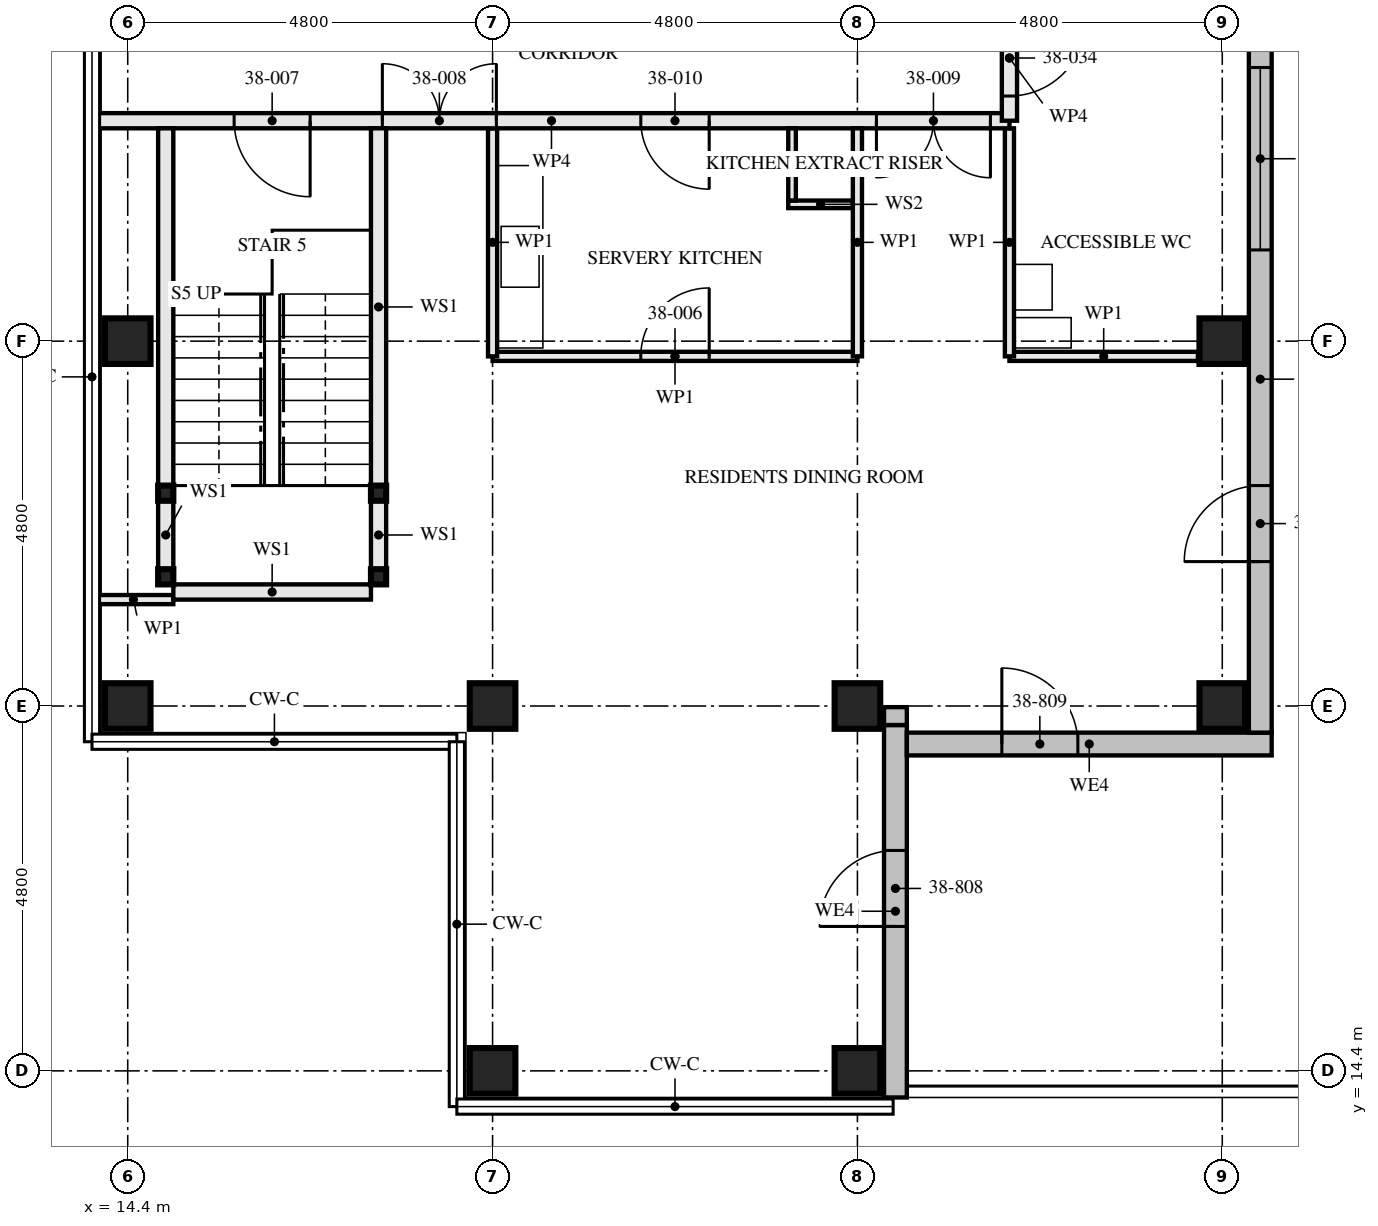
"""IFC4 building model, lengths in metres.
Left out: names, types, materials, properties, quantities, classifications, styles, units other than length and angle.
Written with IfcOpenShell. Run it as: python <this file> out.ifc"""

import sys

from ifc_helpers import new_model, si_unit, direction, frame, frame_2d, origin, origin_2d, place, context, subcontext, project, spatial, rectangle, hollow_rectangle, extrude, element, fill, save


model = new_model("IFC4")
c1 = context("Model", 3, precision=1e-05, world=origin(), true_north=direction((0.0, 1.0)))
c2 = subcontext(c1, "Body", "Model", "MODEL_VIEW")
j1 = project(units=[si_unit("LENGTHUNIT", "METRE"), si_unit("PLANEANGLEUNIT", "RADIAN")], contexts=[c1])
p1 = place(None, origin())
s1 = spatial("IfcSite", under=j1, at=p1, CompositionType="ELEMENT")
p2 = place(p1, origin())
s2 = spatial("IfcBuilding", under=s1, at=p2, CompositionType="ELEMENT")
p3 = place(p2, frame((0.0, 0.0, 141.0)))
s3 = spatial("IfcBuildingStorey", under=s2, at=p3, CompositionType="ELEMENT", Elevation=141.0)
for number, where, z_axis, x_axis in (
    (1, (14.4, 19.2, 0.0), (0.0, 0.0, 1.0), (0.0, 1.0, 0.0)),
    (2, (14.4, 24.0, 0.0), (0.0, 0.0, 1.0), (1.0, 0.0, 0.0)),
    (3, (19.2, 14.4, 0.0), (0.0, 0.0, 1.0), (0.0, 1.0, 0.0)),
    (4, (19.2, 19.2, 0.0), (0.0, 0.0, 1.0), (0.0, 1.0, 0.0)),
    (5, (24.0, 14.4, 0.0), (0.0, 0.0, 1.0), (0.0, 1.0, 0.0)),
    (6, (24.0, 19.2, 0.0), (0.0, 0.0, 1.0), (0.0, 1.0, 0.0)),
    (7, (28.8, 19.2, 0.0), (0.0, 0.0, 1.0), (0.0, 1.0, 0.0)),
    (8, (28.8, 24.0, 0.0), (0.0, 0.0, 1.0), (1.0, 0.0, 0.0)),
):
    element("IfcColumn", number, at=place(p3, frame(where, z_axis=z_axis, x_axis=x_axis)), inside=s3, PredefinedType="COLUMN", context=c2, shape_type="SweptSolid", body=[
        extrude(hollow_rectangle(XDim=0.6, YDim=0.6, WallThickness=0.08, at=origin_2d()), origin(), (0.0, 0.0, 1.0), 3.5),
    ])
for number, where, z_axis, x_axis in (
    (9, (14.9, 20.9, 0.0), (0.0, 0.0, 1.0), (1.0, 0.0, 0.0)),
    (10, (17.7, 20.9, 0.0), (0.0, 0.0, 1.0), (1.0, 0.0, 0.0)),
    (11, (14.9, 22.0, 0.0), (0.0, 0.0, 1.0), (1.0, 0.0, 0.0)),
    (12, (17.7, 22.0, 0.0), (0.0, 0.0, 1.0), (1.0, 0.0, 0.0)),
):
    element("IfcColumn", number, at=place(p3, frame(where, z_axis=z_axis, x_axis=x_axis)), inside=s3, PredefinedType="COLUMN", context=c2, shape_type="SweptSolid", body=[
        extrude(hollow_rectangle(XDim=0.2, YDim=0.2, WallThickness=0.008, at=origin_2d()), origin(), (0.0, 0.0, 1.0), 3.33),
    ])
p4 = place(p3, frame((24.5, 14.05, 0.0), z_axis=(0.0, 0.0, 1.0), x_axis=(0.0, 1.0, 0.0)))
e13 = element("IfcWall", 13, at=p4, inside=s3, PredefinedType="SOLIDWALL", context=c2, shape_type="SweptSolid", body=[
    extrude(rectangle(XDim=4.9, YDim=0.3, at=frame_2d((2.45, 0.0))), origin(), (0.0, 0.0, 1.0), 3.5),
])
p5 = place(p4, frame((2.25, 0.0, 0.0)))
e14 = element("IfcOpeningElement", 14, at=p5, cuts=e13, PredefinedType="OPENING", context=c2, shape_type="SweptSolid", body=[
    extrude(rectangle(XDim=1.0, YDim=2.4, at=frame_2d((0.5, 1.2))), frame((0.0, 0.161, 0.0), z_axis=(0.0, -1.0, 0.0), x_axis=(1.0, 0.0, 0.0)), (0.0, 0.0, 1.0), 0.321),
])
p6 = place(p3, frame((24.65, 18.7, 0.0), z_axis=(0.0, 0.0, 1.0), x_axis=(1.0, 0.0, 0.0)))
e15 = element("IfcWall", 15, at=p6, inside=s3, PredefinedType="SOLIDWALL", context=c2, shape_type="SweptSolid", body=[
    extrude(rectangle(XDim=4.8, YDim=0.3, at=frame_2d((2.4, 0.0))), origin(), (0.0, 0.0, 1.0), 3.5),
])
p7 = place(p6, frame((1.25, 0.0, 0.0)))
e16 = element("IfcOpeningElement", 16, at=p7, cuts=e15, PredefinedType="OPENING", context=c2, shape_type="SweptSolid", body=[
    extrude(rectangle(XDim=1.0, YDim=2.4, at=frame_2d((0.5, 1.2))), frame((0.0, 0.161, 0.0), z_axis=(0.0, -1.0, 0.0), x_axis=(1.0, 0.0, 0.0)), (0.0, 0.0, 1.0), 0.321),
])
p8 = place(p3, frame((29.3, 18.85, 0.0), z_axis=(0.0, 0.0, 1.0), x_axis=(0.0, 1.0, 0.0)))
e17 = element("IfcWall", 17, at=p8, inside=s3, PredefinedType="SOLIDWALL", context=c2, shape_type="SweptSolid", body=[
    extrude(rectangle(XDim=9.3, YDim=0.3, at=frame_2d((4.65, 0.0))), origin(), (0.0, 0.0, 1.0), 3.5),
])
p9 = place(p8, frame((2.25, 0.0, 0.0)))
e18 = element("IfcOpeningElement", 18, at=p9, cuts=e17, PredefinedType="OPENING", context=c2, shape_type="SweptSolid", body=[
    extrude(rectangle(XDim=1.0, YDim=2.4, at=frame_2d((0.5, 1.2))), frame((0.0, 0.161, 0.0), z_axis=(0.0, -1.0, 0.0), x_axis=(1.0, 0.0, 0.0)), (0.0, 0.0, 1.0), 0.321),
])
p10 = place(p8, frame((6.35, 0.0, 0.6)))
e19 = element("IfcOpeningElement", 19, at=p10, cuts=e17, PredefinedType="OPENING", context=c2, shape_type="SweptSolid", body=[
    extrude(rectangle(XDim=2.4, YDim=1.8, at=frame_2d((1.2, 0.9))), frame((0.0, 0.161, 0.0), z_axis=(0.0, -1.0, 0.0), x_axis=(1.0, 0.0, 0.0)), (0.0, 0.0, 1.0), 0.321),
])
p11 = place(p3, frame((24.5, 18.95, 2.39), z_axis=(0.0, 0.0, 1.0), x_axis=(0.0, 1.0, 0.0)))
e20 = element("IfcWall", 20, at=p11, inside=s3, PredefinedType="SOLIDWALL", context=c2, shape_type="SweptSolid", body=[
    extrude(rectangle(XDim=0.235, YDim=0.3, at=frame_2d((0.118, 0.0))), origin(), (0.0, 0.0, 1.0), 0.88),
])
p12 = place(p3, frame((14.9, 21.0, 0.0), z_axis=(0.0, 0.0, 1.0), x_axis=(0.0, 1.0, 0.0)))
e21 = element("IfcWall", 21, at=p12, inside=s3, PredefinedType="SOLIDWALL", context=c2, shape_type="SweptSolid", body=[
    extrude(rectangle(XDim=0.9, YDim=0.2, at=frame_2d((0.45, 0.0))), origin(), (0.0, 0.0, 1.0), 2.99),
])
p13 = place(p3, frame((14.9, 22.1, 0.0), z_axis=(0.0, 0.0, 1.0), x_axis=(0.0, 1.0, 0.0)))
e22 = element("IfcWall", 22, at=p13, inside=s3, PredefinedType="SOLIDWALL", context=c2, shape_type="SweptSolid", body=[
    extrude(rectangle(XDim=4.7, YDim=0.2, at=frame_2d((2.35, 0.0))), origin(), (0.0, 0.0, 1.0), 2.99),
])
p14 = place(p3, frame((17.7, 21.0, 0.0), z_axis=(0.0, 0.0, 1.0), x_axis=(0.0, 1.0, 0.0)))
e23 = element("IfcWall", 23, at=p14, inside=s3, PredefinedType="SOLIDWALL", context=c2, shape_type="SweptSolid", body=[
    extrude(rectangle(XDim=0.9, YDim=0.2, at=frame_2d((0.45, 0.0))), origin(), (0.0, 0.0, 1.0), 2.99),
])
p15 = place(p3, frame((17.7, 22.1, 0.0), z_axis=(0.0, 0.0, 1.0), x_axis=(0.0, 1.0, 0.0)))
e24 = element("IfcWall", 24, at=p15, inside=s3, PredefinedType="SOLIDWALL", context=c2, shape_type="SweptSolid", body=[
    extrude(rectangle(XDim=4.7, YDim=0.2, at=frame_2d((2.35, 0.0))), origin(), (0.0, 0.0, 1.0), 2.99),
])
p16 = place(p3, frame((15.0, 20.7, 0.0), z_axis=(0.0, 0.0, 1.0), x_axis=(1.0, 0.0, 0.0)))
e25 = element("IfcWall", 25, at=p16, inside=s3, PredefinedType="SOLIDWALL", context=c2, shape_type="SweptSolid", body=[
    extrude(rectangle(XDim=2.6, YDim=0.2, at=frame_2d((1.3, 0.0))), origin(), (0.0, 0.0, 1.0), 3.33),
])
p17 = place(p3, frame((24.0, 23.8, 0.0), z_axis=(0.0, 0.0, 1.0), x_axis=(0.0, 1.0, 0.0)))
e26 = element("IfcWall", 26, at=p17, inside=s3, PredefinedType="PARTITIONING", context=c2, shape_type="SweptSolid", body=[
    extrude(rectangle(XDim=3.0, YDim=0.12, at=frame_2d((1.5, 0.0))), origin(), (0.0, 0.0, 1.0), 2.55),
])
p18 = place(p3, frame((23.14, 25.85, 0.0), z_axis=(0.0, 0.0, 1.0), x_axis=(0.0, 1.0, 0.0)))
e27 = element("IfcWall", 27, at=p18, inside=s3, PredefinedType="SOLIDWALL", context=c2, shape_type="SweptSolid", body=[
    extrude(rectangle(XDim=0.95, YDim=0.1, at=frame_2d((0.475, 0.0))), origin(), (0.0, 0.0, 1.0), 3.33),
])
p19 = place(p3, frame((23.09, 25.8, 0.0), z_axis=(0.0, 0.0, 1.0), x_axis=(1.0, 0.0, 0.0)))
e28 = element("IfcWall", 28, at=p19, inside=s3, PredefinedType="SOLIDWALL", context=c2, shape_type="SweptSolid", body=[
    extrude(rectangle(XDim=0.85, YDim=0.1, at=frame_2d((0.425, 0.0))), origin(), (0.0, 0.0, 1.0), 3.33),
])
p20 = place(p3, frame((19.2, 23.8, 0.0), z_axis=(0.0, 0.0, 1.0), x_axis=(0.0, 1.0, 0.0)))
e29 = element("IfcWall", 29, at=p20, inside=s3, PredefinedType="PARTITIONING", context=c2, shape_type="SweptSolid", body=[
    extrude(rectangle(XDim=3.0, YDim=0.12, at=frame_2d((1.5, 0.0))), origin(), (0.0, 0.0, 1.0), 2.55),
])
p21 = place(p3, frame((19.2, 23.8, 0.0), z_axis=(0.0, 0.0, 1.0), x_axis=(1.0, 0.0, 0.0)))
e30 = element("IfcWall", 30, at=p21, inside=s3, PredefinedType="PARTITIONING", context=c2, shape_type="SweptSolid", body=[
    extrude(rectangle(XDim=4.8, YDim=0.12, at=frame_2d((2.4, 0.0))), origin(), (0.0, 0.0, 1.0), 3.33),
])
p22 = place(p21, frame((1.95, 0.0, 0.0)))
e31 = element("IfcOpeningElement", 31, at=p22, cuts=e30, PredefinedType="OPENING", context=c2, shape_type="SweptSolid", body=[
    extrude(rectangle(XDim=0.9, YDim=2.1, at=frame_2d((0.45, 1.05))), frame((0.0, 0.071, 0.0), z_axis=(0.0, -1.0, 0.0), x_axis=(1.0, 0.0, 0.0)), (0.0, 0.0, 1.0), 0.141),
])
p23 = place(p3, frame((26.0, 23.8, 0.0), z_axis=(0.0, 0.0, 1.0), x_axis=(0.0, 1.0, 0.0)))
e32 = element("IfcWall", 32, at=p23, inside=s3, PredefinedType="PARTITIONING", context=c2, shape_type="SweptSolid", body=[
    extrude(rectangle(XDim=3.0, YDim=0.12, at=frame_2d((1.5, 0.0))), origin(), (0.0, 0.0, 1.0), 2.55),
])
p24 = place(p3, frame((26.0, 23.8, 0.0), z_axis=(0.0, 0.0, 1.0), x_axis=(1.0, 0.0, 0.0)))
e33 = element("IfcWall", 33, at=p24, inside=s3, PredefinedType="PARTITIONING", context=c2, shape_type="SweptSolid", body=[
    extrude(rectangle(XDim=2.48, YDim=0.12, at=frame_2d((1.24, 0.0))), origin(), (0.0, 0.0, 1.0), 3.33),
])
p25 = place(p3, frame((13.95, 20.6, 0.0), z_axis=(0.0, 0.0, 1.0), x_axis=(1.0, 0.0, 0.0)))
e34 = element("IfcWall", 34, at=p25, inside=s3, PredefinedType="PARTITIONING", context=c2, shape_type="SweptSolid", body=[
    extrude(rectangle(XDim=1.05, YDim=0.12, at=frame_2d((0.525, 0.0))), origin(), (0.0, 0.0, 1.0), 2.32),
])
p26 = place(p3, frame((13.95, 26.9, 0.0), z_axis=(0.0, 0.0, 1.0), x_axis=(1.0, 0.0, 0.0)))
e35 = element("IfcWall", 35, at=p26, inside=s3, PredefinedType="PARTITIONING", context=c2, shape_type="SweptSolid", body=[
    extrude(rectangle(XDim=12.05, YDim=0.2, at=frame_2d((6.025, 0.0))), origin(), (0.0, 0.0, 1.0), 2.32),
])
p27 = place(p26, frame((1.85, 0.0, 0.0)))
e36 = element("IfcOpeningElement", 36, at=p27, cuts=e35, PredefinedType="OPENING", context=c2, shape_type="SweptSolid", body=[
    extrude(rectangle(XDim=1.0, YDim=2.1, at=frame_2d((0.5, 1.05))), frame((0.0, 0.111, 0.0), z_axis=(0.0, -1.0, 0.0), x_axis=(1.0, 0.0, 0.0)), (0.0, 0.0, 1.0), 0.221),
])
p28 = place(p26, frame((3.8, 0.0, 0.0)))
e37 = element("IfcOpeningElement", 37, at=p28, cuts=e35, PredefinedType="OPENING", context=c2, shape_type="SweptSolid", body=[
    extrude(rectangle(XDim=1.5, YDim=2.1, at=frame_2d((0.75, 1.05))), frame((0.0, 0.111, 0.0), z_axis=(0.0, -1.0, 0.0), x_axis=(1.0, 0.0, 0.0)), (0.0, 0.0, 1.0), 0.221),
])
p29 = place(p26, frame((10.3, 0.0, 0.0)))
e38 = element("IfcOpeningElement", 38, at=p29, cuts=e35, PredefinedType="OPENING", context=c2, shape_type="SweptSolid", body=[
    extrude(rectangle(XDim=1.5, YDim=2.1, at=frame_2d((0.75, 1.05))), frame((0.0, 0.111, 0.0), z_axis=(0.0, -1.0, 0.0), x_axis=(1.0, 0.0, 0.0)), (0.0, 0.0, 1.0), 0.221),
])
p30 = place(p26, frame((7.2, 0.0, 0.0)))
e39 = element("IfcOpeningElement", 39, at=p30, cuts=e35, PredefinedType="OPENING", context=c2, shape_type="SweptSolid", body=[
    extrude(rectangle(XDim=0.9, YDim=2.1, at=frame_2d((0.45, 1.05))), frame((0.0, 0.111, 0.0), z_axis=(0.0, -1.0, 0.0), x_axis=(1.0, 0.0, 0.0)), (0.0, 0.0, 1.0), 0.221),
])
p31 = place(p3, frame((26.0, 26.9, 0.0), z_axis=(0.0, 0.0, 1.0), x_axis=(0.0, 1.0, 0.0)))
e40 = element("IfcWall", 40, at=p31, inside=s3, PredefinedType="PARTITIONING", context=c2, shape_type="SweptSolid", body=[
    extrude(rectangle(XDim=1.65, YDim=0.2, at=frame_2d((0.825, 0.0))), origin(), (0.0, 0.0, 1.0), 3.33),
])
p32 = place(p31, frame((0.325, 0.0, 0.0)))
e41 = element("IfcOpeningElement", 41, at=p32, cuts=e40, PredefinedType="OPENING", context=c2, shape_type="SweptSolid", body=[
    extrude(rectangle(XDim=1.0, YDim=2.1, at=frame_2d((0.5, 1.05))), frame((0.0, 0.111, 0.0), z_axis=(0.0, -1.0, 0.0), x_axis=(1.0, 0.0, 0.0)), (0.0, 0.0, 1.0), 0.221),
])
p33 = place(p5, origin())
e42 = element("IfcDoor", 42, at=p33, inside=s3, OperationType="SINGLE_SWING_LEFT", PredefinedType="DOOR", context=c2, shape_type="SweptSolid", body=[
    extrude(rectangle(XDim=1.0, YDim=2.4, at=frame_2d((0.5, 1.2))), frame((0.0, 0.035, 0.0), z_axis=(0.0, -1.0, 0.0), x_axis=(1.0, 0.0, 0.0)), (0.0, 0.0, 1.0), 0.07),
])
fill(e14, e42)
p34 = place(p7, origin())
e43 = element("IfcDoor", 43, at=p34, inside=s3, OperationType="SINGLE_SWING_LEFT", PredefinedType="DOOR", context=c2, shape_type="SweptSolid", body=[
    extrude(rectangle(XDim=1.0, YDim=2.4, at=frame_2d((0.5, 1.2))), frame((0.0, 0.035, 0.0), z_axis=(0.0, -1.0, 0.0), x_axis=(1.0, 0.0, 0.0)), (0.0, 0.0, 1.0), 0.07),
])
fill(e16, e43)
p35 = place(p9, origin())
e44 = element("IfcDoor", 44, at=p35, inside=s3, OperationType="SINGLE_SWING_LEFT", PredefinedType="DOOR", context=c2, shape_type="SweptSolid", body=[
    extrude(rectangle(XDim=1.0, YDim=2.4, at=frame_2d((0.5, 1.2))), frame((0.0, 0.035, 0.0), z_axis=(0.0, -1.0, 0.0), x_axis=(1.0, 0.0, 0.0)), (0.0, 0.0, 1.0), 0.07),
])
fill(e18, e44)
p36 = place(p10, origin())
e45 = element("IfcWindow", 45, at=p36, inside=s3, PartitioningType="SINGLE_PANEL", PredefinedType="WINDOW", context=c2, shape_type="SweptSolid", body=[
    extrude(rectangle(XDim=2.4, YDim=1.8, at=frame_2d((1.2, 0.9))), frame((0.0, 0.03, 0.0), z_axis=(0.0, -1.0, 0.0), x_axis=(1.0, 0.0, 0.0)), (0.0, 0.0, 1.0), 0.06),
])
fill(e19, e45)
p37 = place(p22, origin())
e46 = element("IfcDoor", 46, at=p37, inside=s3, OperationType="SINGLE_SWING_LEFT", PredefinedType="DOOR", context=c2, shape_type="SweptSolid", body=[
    extrude(rectangle(XDim=0.9, YDim=2.1, at=frame_2d((0.45, 1.05))), frame((0.0, 0.022, 0.0), z_axis=(0.0, -1.0, 0.0), x_axis=(1.0, 0.0, 0.0)), (0.0, 0.0, 1.0), 0.044),
])
fill(e31, e46)
p38 = place(p27, frame((1.0, 0.0, 0.0), z_axis=(0.0, 0.0, 1.0), x_axis=(-1.0, 0.0, 0.0)))
e47 = element("IfcDoor", 47, at=p38, inside=s3, OperationType="SINGLE_SWING_RIGHT", PredefinedType="DOOR", context=c2, shape_type="SweptSolid", body=[
    extrude(rectangle(XDim=1.0, YDim=2.1, at=frame_2d((0.5, 1.05))), frame((0.0, 0.032, 0.0), z_axis=(0.0, -1.0, 0.0), x_axis=(1.0, 0.0, 0.0)), (0.0, 0.0, 1.0), 0.064),
])
fill(e36, e47)
p39 = place(p28, origin())
e48 = element("IfcDoor", 48, at=p39, inside=s3, OperationType="DOUBLE_DOOR_SINGLE_SWING", PredefinedType="DOOR", context=c2, shape_type="SweptSolid", body=[
    extrude(rectangle(XDim=1.5, YDim=2.1, at=frame_2d((0.75, 1.05))), frame((0.0, 0.027, 0.0), z_axis=(0.0, -1.0, 0.0), x_axis=(1.0, 0.0, 0.0)), (0.0, 0.0, 1.0), 0.054),
])
fill(e37, e48)
p40 = place(p29, frame((1.5, 0.0, 0.0), z_axis=(0.0, 0.0, 1.0), x_axis=(-1.0, 0.0, 0.0)))
e49 = element("IfcDoor", 49, at=p40, inside=s3, OperationType="DOUBLE_DOOR_SINGLE_SWING", PredefinedType="DOOR", context=c2, shape_type="SweptSolid", body=[
    extrude(rectangle(XDim=1.5, YDim=2.1, at=frame_2d((0.75, 1.05))), frame((0.0, 0.027, 0.0), z_axis=(0.0, -1.0, 0.0), x_axis=(1.0, 0.0, 0.0)), (0.0, 0.0, 1.0), 0.054),
])
fill(e38, e49)
p41 = place(p30, frame((0.9, 0.0, 0.0), z_axis=(0.0, 0.0, 1.0), x_axis=(-1.0, 0.0, 0.0)))
e50 = element("IfcDoor", 50, at=p41, inside=s3, OperationType="SINGLE_SWING_RIGHT", PredefinedType="DOOR", context=c2, shape_type="SweptSolid", body=[
    extrude(rectangle(XDim=0.9, YDim=2.1, at=frame_2d((0.45, 1.05))), frame((0.0, 0.027, 0.0), z_axis=(0.0, -1.0, 0.0), x_axis=(1.0, 0.0, 0.0)), (0.0, 0.0, 1.0), 0.054),
])
fill(e39, e50)
p42 = place(p32, frame((1.0, 0.0, 0.0), z_axis=(0.0, 0.0, 1.0), x_axis=(-1.0, 0.0, 0.0)))
e51 = element("IfcDoor", 51, at=p42, inside=s3, OperationType="SINGLE_SWING_RIGHT", PredefinedType="DOOR", context=c2, shape_type="SweptSolid", body=[
    extrude(rectangle(XDim=1.0, YDim=2.1, at=frame_2d((0.5, 1.05))), frame((0.0, 0.027, 0.0), z_axis=(0.0, -1.0, 0.0), x_axis=(1.0, 0.0, 0.0)), (0.0, 0.0, 1.0), 0.054),
])
fill(e41, e51)
save(model, sys.argv[1])
